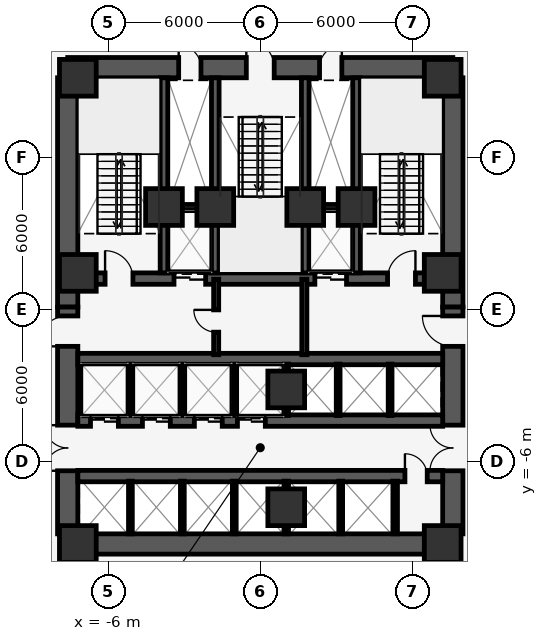
"""IFC4 building model, lengths in metres.
Left out: names, types, materials, properties, quantities, classifications, styles, units other than length and angle.
Written with IfcOpenShell. Run it as: python <this file> out.ifc"""

import sys

from ifc_helpers import new_model, si_unit, direction, frame, frame_2d, origin, origin_2d, place, context, subcontext, project, spatial, rectangle, extrude, element, fill, save


model = new_model("IFC4")
c1 = context("Model", 3, precision=1e-05, world=origin(), true_north=direction((0.0, 1.0)))
c2 = subcontext(c1, "Body", "Model", "MODEL_VIEW")
j1 = project(units=[si_unit("LENGTHUNIT", "METRE"), si_unit("PLANEANGLEUNIT", "RADIAN")], contexts=[c1])
p1 = place(None, origin())
s1 = spatial("IfcSite", under=j1, at=p1, CompositionType="ELEMENT")
p2 = place(p1, origin())
s2 = spatial("IfcBuilding", under=s1, at=p2, CompositionType="ELEMENT")
p3 = place(p2, frame((0.0, 0.0, 115.0)))
s3 = spatial("IfcBuildingStorey", under=s2, at=p3, CompositionType="ELEMENT", Elevation=115.0)
p4 = place(p3, frame((-7.6, 9.55, 0.0), z_axis=(0.0, 0.0, 1.0), x_axis=(1.0, 0.0, 0.0)))
e1 = element("IfcWall", 1, at=p4, inside=s3, PredefinedType="SHEAR", context=c2, shape_type="SweptSolid", body=[
    extrude(rectangle(XDim=15.2, YDim=0.8, at=frame_2d((7.6, 0.0))), origin(), (0.0, 0.0, 1.0), 3.75),
])
p5 = place(p4, frame((7.05, 0.0, 0.0)))
e2 = element("IfcOpeningElement", 2, at=p5, cuts=e1, PredefinedType="OPENING", context=c2, shape_type="SweptSolid", body=[
    extrude(rectangle(XDim=1.1, YDim=2.15, at=frame_2d((0.55, 1.075))), frame((0.0, 0.41, 0.0), z_axis=(0.0, -1.0, 0.0), x_axis=(1.0, 0.0, 0.0)), (0.0, 0.0, 1.0), 0.82),
])
p6 = place(p4, frame((4.38, 0.0, 0.0)))
e3 = element("IfcOpeningElement", 3, at=p6, cuts=e1, PredefinedType="OPENING", context=c2, shape_type="SweptSolid", body=[
    extrude(rectangle(XDim=0.88, YDim=2.15, at=frame_2d((0.44, 1.075))), frame((0.0, 0.41, 0.0), z_axis=(0.0, -1.0, 0.0), x_axis=(1.0, 0.0, 0.0)), (0.0, 0.0, 1.0), 0.82),
])
p7 = place(p4, frame((9.94, 0.0, 0.0)))
e4 = element("IfcOpeningElement", 4, at=p7, cuts=e1, PredefinedType="OPENING", context=c2, shape_type="SweptSolid", body=[
    extrude(rectangle(XDim=0.88, YDim=2.15, at=frame_2d((0.44, 1.075))), frame((0.0, 0.41, 0.0), z_axis=(0.0, -1.0, 0.0), x_axis=(1.0, 0.0, 0.0)), (0.0, 0.0, 1.0), 0.82),
])
p8 = place(p3, frame((-7.2, 1.225, 0.0), z_axis=(0.0, 0.0, 1.0), x_axis=(1.0, 0.0, 0.0)))
e5 = element("IfcWall", 5, at=p8, inside=s3, PredefinedType="SHEAR", context=c2, shape_type="SweptSolid", body=[
    extrude(rectangle(XDim=14.4, YDim=0.45, at=frame_2d((7.2, 0.0))), origin(), (0.0, 0.0, 1.0), 3.75),
])
p9 = place(p8, frame((3.795, 0.0, 0.0)))
e6 = element("IfcOpeningElement", 6, at=p9, cuts=e5, PredefinedType="OPENING", context=c2, shape_type="SweptSolid", body=[
    extrude(rectangle(XDim=1.25, YDim=2.25, at=frame_2d((0.625, 1.125))), frame((0.0, 0.235, 0.0), z_axis=(0.0, -1.0, 0.0), x_axis=(1.0, 0.0, 0.0)), (0.0, 0.0, 1.0), 0.47),
])
p10 = place(p8, frame((9.355, 0.0, 0.0)))
e7 = element("IfcOpeningElement", 7, at=p10, cuts=e5, PredefinedType="OPENING", context=c2, shape_type="SweptSolid", body=[
    extrude(rectangle(XDim=1.25, YDim=2.25, at=frame_2d((0.625, 1.125))), frame((0.0, 0.235, 0.0), z_axis=(0.0, -1.0, 0.0), x_axis=(1.0, 0.0, 0.0)), (0.0, 0.0, 1.0), 0.47),
])
p11 = place(p8, frame((1.075, 0.0, 0.0)))
e8 = element("IfcOpeningElement", 8, at=p11, cuts=e5, PredefinedType="OPENING", context=c2, shape_type="SweptSolid", body=[
    extrude(rectangle(XDim=1.1, YDim=2.15, at=frame_2d((0.55, 1.075))), frame((0.0, 0.235, 0.0), z_axis=(0.0, -1.0, 0.0), x_axis=(1.0, 0.0, 0.0)), (0.0, 0.0, 1.0), 0.47),
])
p12 = place(p8, frame((12.225, 0.0, 0.0)))
e9 = element("IfcOpeningElement", 9, at=p12, cuts=e5, PredefinedType="OPENING", context=c2, shape_type="SweptSolid", body=[
    extrude(rectangle(XDim=1.1, YDim=2.15, at=frame_2d((0.55, 1.075))), frame((0.0, 0.235, 0.0), z_axis=(0.0, -1.0, 0.0), x_axis=(1.0, 0.0, 0.0)), (0.0, 0.0, 1.0), 0.47),
])
for number, where, z_axis, x_axis in (
    (10, (-3.8, 1.45, 0.0), (0.0, 0.0, 1.0), (0.0, 1.0, 0.0)),
    (11, (-1.775, 1.45, 0.0), (0.0, 0.0, 1.0), (0.0, 1.0, 0.0)),
    (12, (1.775, 1.45, 0.0), (0.0, 0.0, 1.0), (0.0, 1.0, 0.0)),
    (13, (3.8, 1.45, 0.0), (0.0, 0.0, 1.0), (0.0, 1.0, 0.0)),
):
    element("IfcWall", number, at=place(p3, frame(where, z_axis=z_axis, x_axis=x_axis)), inside=s3, PredefinedType="SHEAR", context=c2, shape_type="SweptSolid", body=[
        extrude(rectangle(XDim=7.7, YDim=0.3, at=frame_2d((3.85, 0.0))), origin(), (0.0, 0.0, 1.0), 3.75),
    ])
for number, where, z_axis, x_axis in (
    (14, (-7.6, 0.1, 0.0), (0.0, 0.0, 1.0), (0.0, 1.0, 0.0)),
    (15, (7.6, 0.1, 0.0), (0.0, 0.0, 1.0), (0.0, 1.0, 0.0)),
):
    element("IfcWall", number, at=place(p3, frame(where, z_axis=z_axis, x_axis=x_axis)), inside=s3, PredefinedType="SHEAR", context=c2, shape_type="SweptSolid", body=[
        extrude(rectangle(XDim=9.05, YDim=0.8, at=frame_2d((4.525, 0.0))), origin(), (0.0, 0.0, 1.0), 3.75),
    ])
p13 = place(p3, frame((-7.6, -8.85, 0.0), z_axis=(0.0, 0.0, 1.0), x_axis=(0.0, 1.0, 0.0)))
e16 = element("IfcWall", 16, at=p13, inside=s3, PredefinedType="SHEAR", context=c2, shape_type="SweptSolid", body=[
    extrude(rectangle(XDim=8.95, YDim=0.8, at=frame_2d((4.475, 0.0))), origin(), (0.0, 0.0, 1.0), 3.75),
])
p14 = place(p13, frame((2.49, 0.0, 0.0)))
e17 = element("IfcOpeningElement", 17, at=p14, cuts=e16, PredefinedType="OPENING", context=c2, shape_type="SweptSolid", body=[
    extrude(rectangle(XDim=1.8, YDim=2.2, at=frame_2d((0.9, 1.1))), frame((0.0, 0.41, 0.0), z_axis=(0.0, -1.0, 0.0), x_axis=(1.0, 0.0, 0.0)), (0.0, 0.0, 1.0), 0.82),
])
p15 = place(p13, frame((7.4, 0.0, 0.0)))
e18 = element("IfcOpeningElement", 18, at=p15, cuts=e16, PredefinedType="OPENING", context=c2, shape_type="SweptSolid", body=[
    extrude(rectangle(XDim=1.2, YDim=2.15, at=frame_2d((0.6, 1.075))), frame((0.0, 0.41, 0.0), z_axis=(0.0, -1.0, 0.0), x_axis=(1.0, 0.0, 0.0)), (0.0, 0.0, 1.0), 0.82),
])
p16 = place(p3, frame((7.6, -8.85, 0.0), z_axis=(0.0, 0.0, 1.0), x_axis=(0.0, 1.0, 0.0)))
e19 = element("IfcWall", 19, at=p16, inside=s3, PredefinedType="SHEAR", context=c2, shape_type="SweptSolid", body=[
    extrude(rectangle(XDim=8.95, YDim=0.8, at=frame_2d((4.475, 0.0))), origin(), (0.0, 0.0, 1.0), 3.75),
])
p17 = place(p16, frame((2.49, 0.0, 0.0)))
e20 = element("IfcOpeningElement", 20, at=p17, cuts=e19, PredefinedType="OPENING", context=c2, shape_type="SweptSolid", body=[
    extrude(rectangle(XDim=1.8, YDim=2.2, at=frame_2d((0.9, 1.1))), frame((0.0, 0.41, 0.0), z_axis=(0.0, -1.0, 0.0), x_axis=(1.0, 0.0, 0.0)), (0.0, 0.0, 1.0), 0.82),
])
p18 = place(p16, frame((7.4, 0.0, 0.0)))
e21 = element("IfcOpeningElement", 21, at=p18, cuts=e19, PredefinedType="OPENING", context=c2, shape_type="SweptSolid", body=[
    extrude(rectangle(XDim=1.2, YDim=2.15, at=frame_2d((0.6, 1.075))), frame((0.0, 0.41, 0.0), z_axis=(0.0, -1.0, 0.0), x_axis=(1.0, 0.0, 0.0)), (0.0, 0.0, 1.0), 0.82),
])
p19 = place(p3, frame((-7.6, -9.25, 0.0), z_axis=(0.0, 0.0, 1.0), x_axis=(1.0, 0.0, 0.0)))
e22 = element("IfcWall", 22, at=p19, inside=s3, PredefinedType="SHEAR", context=c2, shape_type="SweptSolid", body=[
    extrude(rectangle(XDim=15.2, YDim=0.8, at=frame_2d((7.6, 0.0))), origin(), (0.0, 0.0, 1.0), 3.75),
])
p20 = place(p3, frame((-7.2, -1.95, 0.0), z_axis=(0.0, 0.0, 1.0), x_axis=(1.0, 0.0, 0.0)))
e23 = element("IfcWall", 23, at=p20, inside=s3, PredefinedType="SHEAR", context=c2, shape_type="SweptSolid", body=[
    extrude(rectangle(XDim=14.4, YDim=0.45, at=frame_2d((7.2, 0.0))), origin(), (0.0, 0.0, 1.0), 3.75),
])
p21 = place(p3, frame((-7.2, -4.38, 0.0), z_axis=(0.0, 0.0, 1.0), x_axis=(1.0, 0.0, 0.0)))
e24 = element("IfcWall", 24, at=p21, inside=s3, PredefinedType="SHEAR", context=c2, shape_type="SweptSolid", body=[
    extrude(rectangle(XDim=14.4, YDim=0.45, at=frame_2d((7.2, 0.0))), origin(), (0.0, 0.0, 1.0), 3.75),
])
p22 = place(p21, frame((0.5, 0.0, 0.0)))
e25 = element("IfcOpeningElement", 25, at=p22, cuts=e24, PredefinedType="OPENING", context=c2, shape_type="SweptSolid", body=[
    extrude(rectangle(XDim=1.1, YDim=2.2, at=frame_2d((0.55, 1.1))), frame((0.0, 0.235, 0.0), z_axis=(0.0, -1.0, 0.0), x_axis=(1.0, 0.0, 0.0)), (0.0, 0.0, 1.0), 0.47),
])
p23 = place(p21, frame((2.55, 0.0, 0.0)))
e26 = element("IfcOpeningElement", 26, at=p23, cuts=e24, PredefinedType="OPENING", context=c2, shape_type="SweptSolid", body=[
    extrude(rectangle(XDim=1.1, YDim=2.2, at=frame_2d((0.55, 1.1))), frame((0.0, 0.235, 0.0), z_axis=(0.0, -1.0, 0.0), x_axis=(1.0, 0.0, 0.0)), (0.0, 0.0, 1.0), 0.47),
])
p24 = place(p21, frame((4.6, 0.0, 0.0)))
e27 = element("IfcOpeningElement", 27, at=p24, cuts=e24, PredefinedType="OPENING", context=c2, shape_type="SweptSolid", body=[
    extrude(rectangle(XDim=1.1, YDim=2.2, at=frame_2d((0.55, 1.1))), frame((0.0, 0.235, 0.0), z_axis=(0.0, -1.0, 0.0), x_axis=(1.0, 0.0, 0.0)), (0.0, 0.0, 1.0), 0.47),
])
p25 = place(p21, frame((6.3, 0.0, 0.0)))
e28 = element("IfcOpeningElement", 28, at=p25, cuts=e24, PredefinedType="OPENING", context=c2, shape_type="SweptSolid", body=[
    extrude(rectangle(XDim=1.1, YDim=2.2, at=frame_2d((0.55, 1.1))), frame((0.0, 0.235, 0.0), z_axis=(0.0, -1.0, 0.0), x_axis=(1.0, 0.0, 0.0)), (0.0, 0.0, 1.0), 0.47),
])
p26 = place(p3, frame((-7.2, -6.57, 0.0), z_axis=(0.0, 0.0, 1.0), x_axis=(1.0, 0.0, 0.0)))
e29 = element("IfcWall", 29, at=p26, inside=s3, PredefinedType="SHEAR", context=c2, shape_type="SweptSolid", body=[
    extrude(rectangle(XDim=14.4, YDim=0.45, at=frame_2d((7.2, 0.0))), origin(), (0.0, 0.0, 1.0), 3.75),
])
p27 = place(p26, frame((12.91, 0.0, 0.0)))
e30 = element("IfcOpeningElement", 30, at=p27, cuts=e29, PredefinedType="OPENING", context=c2, shape_type="SweptSolid", body=[
    extrude(rectangle(XDim=0.88, YDim=2.15, at=frame_2d((0.44, 1.075))), frame((0.0, 0.235, 0.0), z_axis=(0.0, -1.0, 0.0), x_axis=(1.0, 0.0, 0.0)), (0.0, 0.0, 1.0), 0.47),
])
for number, where, z_axis, x_axis in (
    (31, (-7.2, -9.25, 0.0), (0.0, 0.0, 1.0), (1.0, 0.0, 0.0)),
    (32, (7.2, -9.25, 0.0), (0.0, 0.0, 1.0), (1.0, 0.0, 0.0)),
    (33, (7.2, 1.45, 0.0), (0.0, 0.0, 1.0), (1.0, 0.0, 0.0)),
    (34, (7.2, 9.15, 0.0), (0.0, 0.0, 1.0), (1.0, 0.0, 0.0)),
    (35, (-7.2, 9.15, 0.0), (0.0, 0.0, 1.0), (1.0, 0.0, 0.0)),
    (36, (-7.2, 1.45, 0.0), (0.0, 0.0, 1.0), (1.0, 0.0, 0.0)),
    (37, (-3.8, 4.05, 0.0), (0.0, 0.0, 1.0), (1.0, 0.0, 0.0)),
    (38, (3.8, 4.05, 0.0), (0.0, 0.0, 1.0), (1.0, 0.0, 0.0)),
    (39, (-1.775, 4.05, 0.0), (0.0, 0.0, 1.0), (1.0, 0.0, 0.0)),
    (40, (1.775, 4.05, 0.0), (0.0, 0.0, 1.0), (1.0, 0.0, 0.0)),
    (41, (1.025, -3.15, 0.0), (0.0, 0.0, 1.0), (1.0, 0.0, 0.0)),
    (42, (1.025, -7.8, 0.0), (0.0, 0.0, 1.0), (1.0, 0.0, 0.0)),
):
    element("IfcColumn", number, at=place(p3, frame(where, z_axis=z_axis, x_axis=x_axis)), inside=s3, PredefinedType="COLUMN", context=c2, shape_type="SweptSolid", body=[
        extrude(rectangle(XDim=1.45, YDim=1.45, at=origin_2d()), origin(), (0.0, 0.0, 1.0), 4.0),
    ])
p28 = place(p3, frame((-4.698, 37.402, 0.0), z_axis=(0.0, 0.0, 1.0), x_axis=(0.698490621109, -0.715619208954, 0.0)))
e43 = element("IfcWall", 43, at=p28, inside=s3, PredefinedType="STANDARD", context=c2, shape_type="SweptSolid", body=[
    extrude(rectangle(XDim=61.076, YDim=0.32, at=frame_2d((30.538, 0.0))), origin(), (0.0, 0.0, 1.0), 3.75),
])
p29 = place(p28, frame((30.038, 0.0, 0.0)))
e44 = element("IfcOpeningElement", 44, at=p29, cuts=e43, PredefinedType="OPENING", context=c2, shape_type="SweptSolid", body=[
    extrude(rectangle(XDim=1.0, YDim=2.15, at=frame_2d((0.5, 1.075))), frame((0.0, 0.17, 0.0), z_axis=(0.0, -1.0, 0.0), x_axis=(1.0, 0.0, 0.0)), (0.0, 0.0, 1.0), 0.34),
])
for number, where, z_axis, x_axis in (
    (45, (-3.65, 4.05, 0.0), (0.0, 0.0, 1.0), (1.0, 0.0, 0.0)),
    (46, (1.92, 4.05, 0.0), (0.0, 0.0, 1.0), (1.0, 0.0, 0.0)),
):
    element("IfcWall", number, at=place(p3, frame(where, z_axis=z_axis, x_axis=x_axis)), inside=s3, PredefinedType="PARTITIONING", context=c2, shape_type="SweptSolid", body=[
        extrude(rectangle(XDim=1.73, YDim=0.2, at=frame_2d((0.865, 0.0))), origin(), (0.0, 0.0, 1.0), 3.75),
    ])
for number, where, z_axis, x_axis in (
    (47, (-5.125, -4.18, 0.0), (0.0, 0.0, 1.0), (0.0, 1.0, 0.0)),
    (48, (-3.075, -4.18, 0.0), (0.0, 0.0, 1.0), (0.0, 1.0, 0.0)),
    (49, (-1.025, -4.18, 0.0), (0.0, 0.0, 1.0), (0.0, 1.0, 0.0)),
):
    element("IfcWall", number, at=place(p3, frame(where, z_axis=z_axis, x_axis=x_axis)), inside=s3, PredefinedType="PARTITIONING", context=c2, shape_type="SweptSolid", body=[
        extrude(rectangle(XDim=2.03, YDim=0.15, at=frame_2d((1.015, 0.0))), origin(), (0.0, 0.0, 1.0), 3.75),
    ])
p30 = place(p3, frame((1.025, -4.18, 0.0), z_axis=(0.0, 0.0, 1.0), x_axis=(0.0, 1.0, 0.0)))
e50 = element("IfcWall", 50, at=p30, inside=s3, PredefinedType="PARTITIONING", context=c2, shape_type="SweptSolid", body=[
    extrude(rectangle(XDim=2.03, YDim=0.18, at=frame_2d((1.015, 0.0))), origin(), (0.0, 0.0, 1.0), 2.798),
])
for number, where, z_axis, x_axis in (
    (51, (3.075, -4.18, 0.0), (0.0, 0.0, 1.0), (0.0, 1.0, 0.0)),
    (52, (5.125, -4.18, 0.0), (0.0, 0.0, 1.0), (0.0, 1.0, 0.0)),
):
    element("IfcWall", number, at=place(p3, frame(where, z_axis=z_axis, x_axis=x_axis)), inside=s3, PredefinedType="PARTITIONING", context=c2, shape_type="SweptSolid", body=[
        extrude(rectangle(XDim=2.03, YDim=0.15, at=frame_2d((1.015, 0.0))), origin(), (0.0, 0.0, 1.0), 3.75),
    ])
for number, where, z_axis, x_axis in (
    (53, (-5.125, -8.85, 0.0), (0.0, 0.0, 1.0), (0.0, 1.0, 0.0)),
    (54, (-3.075, -8.85, 0.0), (0.0, 0.0, 1.0), (0.0, 1.0, 0.0)),
    (55, (-1.025, -8.85, 0.0), (0.0, 0.0, 1.0), (0.0, 1.0, 0.0)),
):
    element("IfcWall", number, at=place(p3, frame(where, z_axis=z_axis, x_axis=x_axis)), inside=s3, PredefinedType="PARTITIONING", context=c2, shape_type="SweptSolid", body=[
        extrude(rectangle(XDim=2.08, YDim=0.15, at=frame_2d((1.04, 0.0))), origin(), (0.0, 0.0, 1.0), 3.75),
    ])
p31 = place(p3, frame((1.025, -8.85, 0.0), z_axis=(0.0, 0.0, 1.0), x_axis=(0.0, 1.0, 0.0)))
e56 = element("IfcWall", 56, at=p31, inside=s3, PredefinedType="PARTITIONING", context=c2, shape_type="SweptSolid", body=[
    extrude(rectangle(XDim=2.08, YDim=0.18, at=frame_2d((1.04, 0.0))), origin(), (0.0, 0.0, 1.0), 2.798),
])
p32 = place(p3, frame((3.175, -8.85, 0.0), z_axis=(0.0, 0.0, 1.0), x_axis=(0.0, 1.0, 0.0)))
e57 = element("IfcWall", 57, at=p32, inside=s3, PredefinedType="PARTITIONING", context=c2, shape_type="SweptSolid", body=[
    extrude(rectangle(XDim=2.08, YDim=0.15, at=frame_2d((1.04, 0.0))), origin(), (0.0, 0.0, 1.0), 3.75),
])
p33 = place(p3, frame((5.325, -8.85, 0.0), z_axis=(0.0, 0.0, 1.0), x_axis=(0.0, 1.0, 0.0)))
e58 = element("IfcWall", 58, at=p33, inside=s3, PredefinedType="PARTITIONING", context=c2, shape_type="SweptSolid", body=[
    extrude(rectangle(XDim=2.08, YDim=0.18, at=frame_2d((1.04, 0.0))), origin(), (0.0, 0.0, 1.0), 3.75),
])
p34 = place(p3, frame((-1.74, -1.78, 0.0), z_axis=(0.0, 0.0, 1.0), x_axis=(0.0, 1.0, 0.0)))
e59 = element("IfcWall", 59, at=p34, inside=s3, PredefinedType="PARTITIONING", context=c2, shape_type="SweptSolid", body=[
    extrude(rectangle(XDim=2.98, YDim=0.2, at=frame_2d((1.49, 0.0))), origin(), (0.0, 0.0, 1.0), 3.75),
])
p35 = place(p34, frame((0.89, 0.0, 0.0)))
e60 = element("IfcOpeningElement", 60, at=p35, cuts=e59, PredefinedType="OPENING", context=c2, shape_type="SweptSolid", body=[
    extrude(rectangle(XDim=0.88, YDim=2.15, at=frame_2d((0.44, 1.075))), frame((0.0, 0.11, 0.0), z_axis=(0.0, -1.0, 0.0), x_axis=(1.0, 0.0, 0.0)), (0.0, 0.0, 1.0), 0.22),
])
p36 = place(p3, frame((1.74, -1.78, 0.0), z_axis=(0.0, 0.0, 1.0), x_axis=(0.0, 1.0, 0.0)))
e61 = element("IfcWall", 61, at=p36, inside=s3, PredefinedType="PARTITIONING", context=c2, shape_type="SweptSolid", body=[
    extrude(rectangle(XDim=2.98, YDim=0.2, at=frame_2d((1.49, 0.0))), origin(), (0.0, 0.0, 1.0), 3.75),
])
p37 = place(p22, origin())
e62 = element("IfcDoor", 62, at=p37, inside=s3, OperationType="DOUBLE_DOOR_SLIDING", PredefinedType="DOOR", context=c2, shape_type="SweptSolid", body=[
    extrude(rectangle(XDim=1.1, YDim=2.2, at=frame_2d((0.55, 1.1))), frame((0.0, 0.025, 0.0), z_axis=(0.0, -1.0, 0.0), x_axis=(1.0, 0.0, 0.0)), (0.0, 0.0, 1.0), 0.05),
])
fill(e25, e62)
p38 = place(p23, origin())
e63 = element("IfcDoor", 63, at=p38, inside=s3, OperationType="DOUBLE_DOOR_SLIDING", PredefinedType="DOOR", context=c2, shape_type="SweptSolid", body=[
    extrude(rectangle(XDim=1.1, YDim=2.2, at=frame_2d((0.55, 1.1))), frame((0.0, 0.025, 0.0), z_axis=(0.0, -1.0, 0.0), x_axis=(1.0, 0.0, 0.0)), (0.0, 0.0, 1.0), 0.05),
])
fill(e26, e63)
p39 = place(p24, origin())
e64 = element("IfcDoor", 64, at=p39, inside=s3, OperationType="DOUBLE_DOOR_SLIDING", PredefinedType="DOOR", context=c2, shape_type="SweptSolid", body=[
    extrude(rectangle(XDim=1.1, YDim=2.2, at=frame_2d((0.55, 1.1))), frame((0.0, 0.025, 0.0), z_axis=(0.0, -1.0, 0.0), x_axis=(1.0, 0.0, 0.0)), (0.0, 0.0, 1.0), 0.05),
])
fill(e27, e64)
p40 = place(p25, origin())
e65 = element("IfcDoor", 65, at=p40, inside=s3, OperationType="DOUBLE_DOOR_SLIDING", PredefinedType="DOOR", context=c2, shape_type="SweptSolid", body=[
    extrude(rectangle(XDim=1.1, YDim=2.2, at=frame_2d((0.55, 1.1))), frame((0.0, 0.025, 0.0), z_axis=(0.0, -1.0, 0.0), x_axis=(1.0, 0.0, 0.0)), (0.0, 0.0, 1.0), 0.05),
])
fill(e28, e65)
p41 = place(p9, origin())
e66 = element("IfcDoor", 66, at=p41, inside=s3, OperationType="DOUBLE_DOOR_SLIDING", PredefinedType="DOOR", context=c2, shape_type="SweptSolid", body=[
    extrude(rectangle(XDim=1.25, YDim=2.25, at=frame_2d((0.625, 1.125))), frame((0.0, 0.025, 0.0), z_axis=(0.0, -1.0, 0.0), x_axis=(1.0, 0.0, 0.0)), (0.0, 0.0, 1.0), 0.05),
])
fill(e6, e66)
p42 = place(p10, origin())
e67 = element("IfcDoor", 67, at=p42, inside=s3, OperationType="DOUBLE_DOOR_SLIDING", PredefinedType="DOOR", context=c2, shape_type="SweptSolid", body=[
    extrude(rectangle(XDim=1.25, YDim=2.25, at=frame_2d((0.625, 1.125))), frame((0.0, 0.025, 0.0), z_axis=(0.0, -1.0, 0.0), x_axis=(1.0, 0.0, 0.0)), (0.0, 0.0, 1.0), 0.05),
])
fill(e7, e67)
p43 = place(p11, origin())
e68 = element("IfcDoor", 68, at=p43, inside=s3, OperationType="SINGLE_SWING_LEFT", PredefinedType="DOOR", context=c2, shape_type="SweptSolid", body=[
    extrude(rectangle(XDim=1.1, YDim=2.15, at=frame_2d((0.55, 1.075))), frame((0.0, 0.025, 0.0), z_axis=(0.0, -1.0, 0.0), x_axis=(1.0, 0.0, 0.0)), (0.0, 0.0, 1.0), 0.05),
])
fill(e8, e68)
p44 = place(p12, origin())
e69 = element("IfcDoor", 69, at=p44, inside=s3, OperationType="SINGLE_SWING_RIGHT", PredefinedType="DOOR", context=c2, shape_type="SweptSolid", body=[
    extrude(rectangle(XDim=1.1, YDim=2.15, at=frame_2d((0.55, 1.075))), frame((0.0, 0.025, 0.0), z_axis=(0.0, -1.0, 0.0), x_axis=(1.0, 0.0, 0.0)), (0.0, 0.0, 1.0), 0.05),
])
fill(e9, e69)
p45 = place(p5, origin())
e70 = element("IfcDoor", 70, at=p45, inside=s3, OperationType="SINGLE_SWING_LEFT", PredefinedType="DOOR", context=c2, shape_type="SweptSolid", body=[
    extrude(rectangle(XDim=1.1, YDim=2.15, at=frame_2d((0.55, 1.075))), frame((0.0, 0.025, 0.0), z_axis=(0.0, -1.0, 0.0), x_axis=(1.0, 0.0, 0.0)), (0.0, 0.0, 1.0), 0.05),
])
fill(e2, e70)
p46 = place(p6, origin())
e71 = element("IfcDoor", 71, at=p46, inside=s3, OperationType="SINGLE_SWING_LEFT", PredefinedType="DOOR", context=c2, shape_type="SweptSolid", body=[
    extrude(rectangle(XDim=0.88, YDim=2.15, at=frame_2d((0.44, 1.075))), frame((0.0, 0.025, 0.0), z_axis=(0.0, -1.0, 0.0), x_axis=(1.0, 0.0, 0.0)), (0.0, 0.0, 1.0), 0.05),
])
fill(e3, e71)
p47 = place(p7, origin())
e72 = element("IfcDoor", 72, at=p47, inside=s3, OperationType="SINGLE_SWING_RIGHT", PredefinedType="DOOR", context=c2, shape_type="SweptSolid", body=[
    extrude(rectangle(XDim=0.88, YDim=2.15, at=frame_2d((0.44, 1.075))), frame((0.0, 0.025, 0.0), z_axis=(0.0, -1.0, 0.0), x_axis=(1.0, 0.0, 0.0)), (0.0, 0.0, 1.0), 0.05),
])
fill(e4, e72)
p48 = place(p14, origin())
e73 = element("IfcDoor", 73, at=p48, inside=s3, OperationType="DOUBLE_DOOR_SINGLE_SWING", PredefinedType="DOOR", context=c2, shape_type="SweptSolid", body=[
    extrude(rectangle(XDim=1.8, YDim=2.2, at=frame_2d((0.9, 1.1))), frame((0.0, 0.025, 0.0), z_axis=(0.0, -1.0, 0.0), x_axis=(1.0, 0.0, 0.0)), (0.0, 0.0, 1.0), 0.05),
])
fill(e17, e73)
p49 = place(p15, origin())
e74 = element("IfcDoor", 74, at=p49, inside=s3, OperationType="SINGLE_SWING_LEFT", PredefinedType="DOOR", context=c2, shape_type="SweptSolid", body=[
    extrude(rectangle(XDim=1.2, YDim=2.15, at=frame_2d((0.6, 1.075))), frame((0.0, 0.025, 0.0), z_axis=(0.0, -1.0, 0.0), x_axis=(1.0, 0.0, 0.0)), (0.0, 0.0, 1.0), 0.05),
])
fill(e18, e74)
p50 = place(p17, origin())
e75 = element("IfcDoor", 75, at=p50, inside=s3, OperationType="DOUBLE_DOOR_SINGLE_SWING", PredefinedType="DOOR", context=c2, shape_type="SweptSolid", body=[
    extrude(rectangle(XDim=1.8, YDim=2.2, at=frame_2d((0.9, 1.1))), frame((0.0, 0.025, 0.0), z_axis=(0.0, -1.0, 0.0), x_axis=(1.0, 0.0, 0.0)), (0.0, 0.0, 1.0), 0.05),
])
fill(e20, e75)
p51 = place(p18, origin())
e76 = element("IfcDoor", 76, at=p51, inside=s3, OperationType="SINGLE_SWING_RIGHT", PredefinedType="DOOR", context=c2, shape_type="SweptSolid", body=[
    extrude(rectangle(XDim=1.2, YDim=2.15, at=frame_2d((0.6, 1.075))), frame((0.0, 0.025, 0.0), z_axis=(0.0, -1.0, 0.0), x_axis=(1.0, 0.0, 0.0)), (0.0, 0.0, 1.0), 0.05),
])
fill(e21, e76)
p52 = place(p27, origin())
e77 = element("IfcDoor", 77, at=p52, inside=s3, OperationType="SINGLE_SWING_LEFT", PredefinedType="DOOR", context=c2, shape_type="SweptSolid", body=[
    extrude(rectangle(XDim=0.88, YDim=2.15, at=frame_2d((0.44, 1.075))), frame((0.0, 0.025, 0.0), z_axis=(0.0, -1.0, 0.0), x_axis=(1.0, 0.0, 0.0)), (0.0, 0.0, 1.0), 0.05),
])
fill(e30, e77)
p53 = place(p35, origin())
e78 = element("IfcDoor", 78, at=p53, inside=s3, OperationType="SINGLE_SWING_RIGHT", PredefinedType="DOOR", context=c2, shape_type="SweptSolid", body=[
    extrude(rectangle(XDim=0.88, YDim=2.15, at=frame_2d((0.44, 1.075))), frame((0.0, 0.025, 0.0), z_axis=(0.0, -1.0, 0.0), x_axis=(1.0, 0.0, 0.0)), (0.0, 0.0, 1.0), 0.05),
])
fill(e60, e78)
save(model, sys.argv[1])
